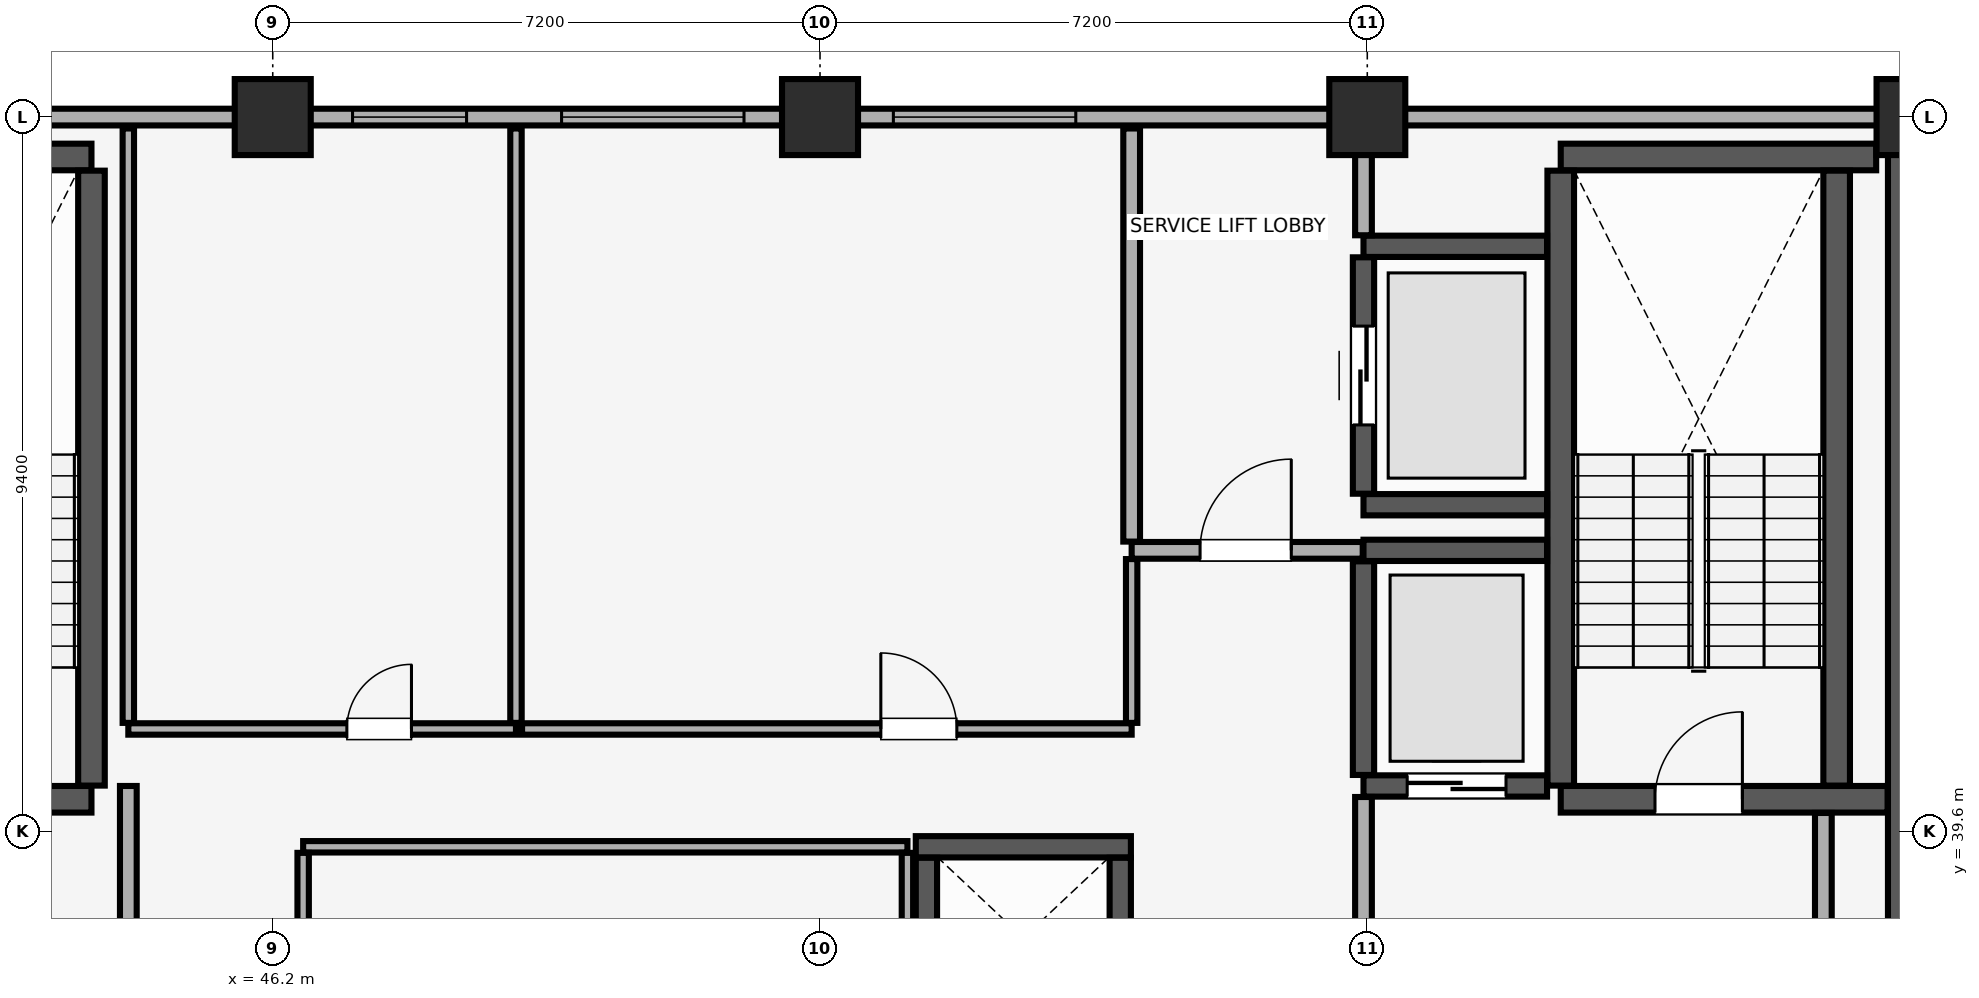
"""IFC4 building model, lengths in metres.
Left out: names, types, materials, properties, quantities, classifications, styles, units other than length and angle.
Written with IfcOpenShell. Run it as: python <this file> out.ifc"""

import sys

from ifc_helpers import new_model, si_unit, direction, frame, frame_2d, origin, origin_2d, place, context, subcontext, project, spatial, rectangle, extrude, element, fill, save


model = new_model("IFC4")
c1 = context("Model", 3, precision=1e-05, world=origin(), true_north=direction((0.0, 1.0)))
c2 = subcontext(c1, "Body", "Model", "MODEL_VIEW")
j1 = project(units=[si_unit("LENGTHUNIT", "METRE"), si_unit("PLANEANGLEUNIT", "RADIAN")], contexts=[c1])
p1 = place(None, origin())
s1 = spatial("IfcSite", under=j1, at=p1, CompositionType="ELEMENT")
p2 = place(p1, origin())
s2 = spatial("IfcBuilding", under=s1, at=p2, CompositionType="ELEMENT")
p3 = place(p2, frame((0.0, 0.0, 276.55)))
s3 = spatial("IfcBuildingStorey", under=s2, at=p3, CompositionType="ELEMENT", Elevation=276.55)
for number, where, z_axis, x_axis in (
    (1, (46.2, 49.0, 0.0), (0.0, 0.0, 1.0), (1.0, 0.0, 0.0)),
    (2, (53.4, 49.0, 0.0), (0.0, 0.0, 1.0), (1.0, 0.0, 0.0)),
    (3, (60.6, 49.0, 0.0), (0.0, 0.0, 1.0), (1.0, 0.0, 0.0)),
    (4, (67.8, 49.0, 0.0), (0.0, 0.0, 1.0), (1.0, 0.0, 0.0)),
):
    element("IfcColumn", number, at=place(p3, frame(where, z_axis=z_axis, x_axis=x_axis)), inside=s3, PredefinedType="COLUMN", context=c2, shape_type="SweptSolid", body=[
        extrude(rectangle(XDim=1.0, YDim=1.0, at=origin_2d()), origin(), (0.0, 0.0, 1.0), 3.6),
    ])
p4 = place(p3, frame((74.2, 49.0, 0.0), z_axis=(0.0, 0.0, 1.0), x_axis=(-1.0, 0.0, 0.0)))
e5 = element("IfcWall", 5, at=p4, inside=s3, PredefinedType="SOLIDWALL", context=c2, shape_type="SweptSolid", body=[
    extrude(rectangle(XDim=64.4, YDim=0.22, at=frame_2d((32.2, 0.0))), origin(), (0.0, 0.0, 1.0), 2.8),
])
p5 = place(p4, frame((59.815, 0.0, 0.85)))
e6 = element("IfcOpeningElement", 6, at=p5, cuts=e5, PredefinedType="OPENING", context=c2, shape_type="SweptSolid", body=[
    extrude(rectangle(XDim=3.0, YDim=1.5, at=frame_2d((1.5, 0.75))), frame((0.0, 0.12, 0.0), z_axis=(0.0, -1.0, 0.0), x_axis=(1.0, 0.0, 0.0)), (0.0, 0.0, 1.0), 0.24),
])
p6 = place(p4, frame((1.585, 0.0, 0.85)))
e7 = element("IfcOpeningElement", 7, at=p6, cuts=e5, PredefinedType="OPENING", context=c2, shape_type="SweptSolid", body=[
    extrude(rectangle(XDim=3.0, YDim=1.5, at=frame_2d((1.5, 0.75))), frame((0.0, 0.12, 0.0), z_axis=(0.0, -1.0, 0.0), x_axis=(1.0, 0.0, 0.0)), (0.0, 0.0, 1.0), 0.24),
])
p7 = place(p4, frame((46.665, 0.0, 0.9)))
e8 = element("IfcOpeningElement", 8, at=p7, cuts=e5, PredefinedType="OPENING", context=c2, shape_type="SweptSolid", body=[
    extrude(rectangle(XDim=1.5, YDim=1.4, at=frame_2d((0.75, 0.7))), frame((0.0, 0.12, 0.0), z_axis=(0.0, -1.0, 0.0), x_axis=(1.0, 0.0, 0.0)), (0.0, 0.0, 1.0), 0.24),
])
p8 = place(p4, frame((38.85, 0.0, 0.9)))
e9 = element("IfcOpeningElement", 9, at=p8, cuts=e5, PredefinedType="OPENING", context=c2, shape_type="SweptSolid", body=[
    extrude(rectangle(XDim=3.6, YDim=1.5, at=frame_2d((1.8, 0.75))), frame((0.0, 0.12, 0.0), z_axis=(0.0, -1.0, 0.0), x_axis=(1.0, 0.0, 0.0)), (0.0, 0.0, 1.0), 0.24),
])
p9 = place(p4, frame((25.45, 0.0, 0.9)))
e10 = element("IfcOpeningElement", 10, at=p9, cuts=e5, PredefinedType="OPENING", context=c2, shape_type="SweptSolid", body=[
    extrude(rectangle(XDim=1.5, YDim=1.4, at=frame_2d((0.75, 0.7))), frame((0.0, 0.12, 0.0), z_axis=(0.0, -1.0, 0.0), x_axis=(1.0, 0.0, 0.0)), (0.0, 0.0, 1.0), 0.24),
])
p10 = place(p4, frame((21.8, 0.0, 0.9)))
e11 = element("IfcOpeningElement", 11, at=p10, cuts=e5, PredefinedType="OPENING", context=c2, shape_type="SweptSolid", body=[
    extrude(rectangle(XDim=2.4, YDim=1.5, at=frame_2d((1.2, 0.75))), frame((0.0, 0.12, 0.0), z_axis=(0.0, -1.0, 0.0), x_axis=(1.0, 0.0, 0.0)), (0.0, 0.0, 1.0), 0.24),
])
p11 = place(p4, frame((17.435, 0.0, 0.9)))
e12 = element("IfcOpeningElement", 12, at=p11, cuts=e5, PredefinedType="OPENING", context=c2, shape_type="SweptSolid", body=[
    extrude(rectangle(XDim=2.4, YDim=1.5, at=frame_2d((1.2, 0.75))), frame((0.0, 0.12, 0.0), z_axis=(0.0, -1.0, 0.0), x_axis=(1.0, 0.0, 0.0)), (0.0, 0.0, 1.0), 0.24),
])
p12 = place(p3, frame((67.8, 29.4, 0.0), z_axis=(0.0, 0.0, 1.0), x_axis=(0.0, 1.0, 0.0)))
e13 = element("IfcWall", 13, at=p12, inside=s3, PredefinedType="SHEAR", context=c2, shape_type="SweptSolid", body=[
    extrude(rectangle(XDim=19.2, YDim=0.7, at=frame_2d((9.6, 0.0))), origin(), (0.0, 0.0, 1.0), 3.6),
])
p13 = place(p3, frame((40.185, 40.025, 0.0), z_axis=(0.0, 0.0, 1.0), x_axis=(1.0, 0.0, 0.0)))
e14 = element("IfcWall", 14, at=p13, inside=s3, PredefinedType="SHEAR", context=c2, shape_type="SweptSolid", body=[
    extrude(rectangle(XDim=3.63, YDim=0.35, at=frame_2d((1.815, 0.0))), origin(), (0.0, 0.0, 1.0), 3.6),
])
p14 = place(p13, frame((1.24, 0.0, 0.0)))
e15 = element("IfcOpeningElement", 15, at=p14, cuts=e14, PredefinedType="OPENING", context=c2, shape_type="SweptSolid", body=[
    extrude(rectangle(XDim=1.15, YDim=2.15, at=frame_2d((0.575, 1.075))), frame((0.0, 0.185, 0.0), z_axis=(0.0, -1.0, 0.0), x_axis=(1.0, 0.0, 0.0)), (0.0, 0.0, 1.0), 0.37),
])
p15 = place(p3, frame((40.185, 48.475, 0.0), z_axis=(0.0, 0.0, 1.0), x_axis=(1.0, 0.0, 0.0)))
e16 = element("IfcWall", 16, at=p15, inside=s3, PredefinedType="SHEAR", context=c2, shape_type="SweptSolid", body=[
    extrude(rectangle(XDim=3.63, YDim=0.35, at=frame_2d((1.815, 0.0))), origin(), (0.0, 0.0, 1.0), 3.6),
])
p16 = place(p3, frame((43.815, 40.205, 0.0), z_axis=(0.0, 0.0, 1.0), x_axis=(0.0, 1.0, 0.0)))
e17 = element("IfcWall", 17, at=p16, inside=s3, PredefinedType="SHEAR", context=c2, shape_type="SweptSolid", body=[
    extrude(rectangle(XDim=8.09, YDim=0.35, at=frame_2d((4.045, 0.0))), origin(), (0.0, 0.0, 1.0), 3.6),
])
p17 = place(p3, frame((63.145, 40.025, 0.0), z_axis=(0.0, 0.0, 1.0), x_axis=(1.0, 0.0, 0.0)))
e18 = element("IfcWall", 18, at=p17, inside=s3, PredefinedType="SHEAR", context=c2, shape_type="SweptSolid", body=[
    extrude(rectangle(XDim=4.3, YDim=0.35, at=frame_2d((2.15, 0.0))), origin(), (0.0, 0.0, 1.0), 3.6),
])
p18 = place(p17, frame((1.24, 0.0, 0.0)))
e19 = element("IfcOpeningElement", 19, at=p18, cuts=e18, PredefinedType="OPENING", context=c2, shape_type="SweptSolid", body=[
    extrude(rectangle(XDim=1.15, YDim=2.15, at=frame_2d((0.575, 1.075))), frame((0.0, 0.185, 0.0), z_axis=(0.0, -1.0, 0.0), x_axis=(1.0, 0.0, 0.0)), (0.0, 0.0, 1.0), 0.37),
])
p19 = place(p3, frame((63.145, 48.475, 0.0), z_axis=(0.0, 0.0, 1.0), x_axis=(1.0, 0.0, 0.0)))
e20 = element("IfcWall", 20, at=p19, inside=s3, PredefinedType="SHEAR", context=c2, shape_type="SweptSolid", body=[
    extrude(rectangle(XDim=4.15, YDim=0.35, at=frame_2d((2.075, 0.0))), origin(), (0.0, 0.0, 1.0), 3.6),
])
for number, where, z_axis, x_axis in (
    (21, (63.145, 40.205, 0.0), (0.0, 0.0, 1.0), (0.0, 1.0, 0.0)),
    (22, (66.775, 40.205, 0.0), (0.0, 0.0, 1.0), (0.0, 1.0, 0.0)),
):
    element("IfcWall", number, at=place(p3, frame(where, z_axis=z_axis, x_axis=x_axis)), inside=s3, PredefinedType="SHEAR", context=c2, shape_type="SweptSolid", body=[
        extrude(rectangle(XDim=8.09, YDim=0.35, at=frame_2d((4.045, 0.0))), origin(), (0.0, 0.0, 1.0), 3.6),
    ])
p20 = place(p3, frame((54.66, 39.4, 0.0), z_axis=(0.0, 0.0, 1.0), x_axis=(1.0, 0.0, 0.0)))
e23 = element("IfcWall", 23, at=p20, inside=s3, PredefinedType="SHEAR", context=c2, shape_type="SweptSolid", body=[
    extrude(rectangle(XDim=2.83, YDim=0.28, at=frame_2d((1.415, 0.0))), origin(), (0.0, 0.0, 1.0), 3.6),
])
for number, where, z_axis, x_axis in (
    (24, (54.8, 37.145, 0.0), (0.0, 0.0, 1.0), (0.0, 1.0, 0.0)),
    (25, (57.35, 37.145, 0.0), (0.0, 0.0, 1.0), (0.0, 1.0, 0.0)),
):
    element("IfcWall", number, at=place(p3, frame(where, z_axis=z_axis, x_axis=x_axis)), inside=s3, PredefinedType="SHEAR", context=c2, shape_type="SweptSolid", body=[
        extrude(rectangle(XDim=2.11, YDim=0.28, at=frame_2d((1.055, 0.0))), origin(), (0.0, 0.0, 1.0), 3.6),
    ])
p21 = place(p3, frame((60.55, 40.2, 0.0), z_axis=(0.0, 0.0, 1.0), x_axis=(1.0, 0.0, 0.0)))
e26 = element("IfcWall", 26, at=p21, inside=s3, PredefinedType="SHEAR", context=c2, shape_type="SweptSolid", body=[
    extrude(rectangle(XDim=2.415, YDim=0.28, at=frame_2d((1.208, 0.0))), origin(), (0.0, 0.0, 1.0), 3.6),
])
p22 = place(p21, frame((0.575, 0.0, 0.0)))
e27 = element("IfcOpeningElement", 27, at=p22, cuts=e26, PredefinedType="OPENING", context=c2, shape_type="SweptSolid", body=[
    extrude(rectangle(XDim=1.3, YDim=2.3, at=frame_2d((0.65, 1.15))), frame((0.0, 0.15, 0.0), z_axis=(0.0, -1.0, 0.0), x_axis=(1.0, 0.0, 0.0)), (0.0, 0.0, 1.0), 0.3),
])
p23 = place(p3, frame((60.55, 43.3, 0.0), z_axis=(0.0, 0.0, 1.0), x_axis=(1.0, 0.0, 0.0)))
e28 = element("IfcWall", 28, at=p23, inside=s3, PredefinedType="SHEAR", context=c2, shape_type="SweptSolid", body=[
    extrude(rectangle(XDim=2.415, YDim=0.28, at=frame_2d((1.208, 0.0))), origin(), (0.0, 0.0, 1.0), 3.6),
])
p24 = place(p3, frame((60.55, 40.345, 0.0), z_axis=(0.0, 0.0, 1.0), x_axis=(0.0, 1.0, 0.0)))
e29 = element("IfcWall", 29, at=p24, inside=s3, PredefinedType="SHEAR", context=c2, shape_type="SweptSolid", body=[
    extrude(rectangle(XDim=2.81, YDim=0.28, at=frame_2d((1.405, 0.0))), origin(), (0.0, 0.0, 1.0), 3.6),
])
for number, where, z_axis, x_axis in (
    (30, (60.55, 43.9, 0.0), (0.0, 0.0, 1.0), (1.0, 0.0, 0.0)),
    (31, (60.55, 47.3, 0.0), (0.0, 0.0, 1.0), (1.0, 0.0, 0.0)),
):
    element("IfcWall", number, at=place(p3, frame(where, z_axis=z_axis, x_axis=x_axis)), inside=s3, PredefinedType="SHEAR", context=c2, shape_type="SweptSolid", body=[
        extrude(rectangle(XDim=2.415, YDim=0.28, at=frame_2d((1.208, 0.0))), origin(), (0.0, 0.0, 1.0), 3.6),
    ])
p25 = place(p3, frame((60.55, 44.045, 0.0), z_axis=(0.0, 0.0, 1.0), x_axis=(0.0, 1.0, 0.0)))
e32 = element("IfcWall", 32, at=p25, inside=s3, PredefinedType="SHEAR", context=c2, shape_type="SweptSolid", body=[
    extrude(rectangle(XDim=3.11, YDim=0.28, at=frame_2d((1.555, 0.0))), origin(), (0.0, 0.0, 1.0), 3.6),
])
p26 = place(p25, frame((0.905, 0.0, 0.0)))
e33 = element("IfcOpeningElement", 33, at=p26, cuts=e32, PredefinedType="OPENING", context=c2, shape_type="SweptSolid", body=[
    extrude(rectangle(XDim=1.3, YDim=2.3, at=frame_2d((0.65, 1.15))), frame((0.0, 0.15, 0.0), z_axis=(0.0, -1.0, 0.0), x_axis=(1.0, 0.0, 0.0)), (0.0, 0.0, 1.0), 0.3),
])
p27 = place(p3, frame((60.55, 34.415, 0.0), z_axis=(0.0, 0.0, 1.0), x_axis=(0.0, 1.0, 0.0)))
e34 = element("IfcWall", 34, at=p27, inside=s3, PredefinedType="PARTITIONING", context=c2, shape_type="SweptSolid", body=[
    extrude(rectangle(XDim=5.64, YDim=0.22, at=frame_2d((2.82, 0.0))), origin(), (0.0, 0.0, 1.0), 3.6),
])
p28 = place(p3, frame((66.6, 34.415, 0.0), z_axis=(0.0, 0.0, 1.0), x_axis=(0.0, 1.0, 0.0)))
e35 = element("IfcWall", 35, at=p28, inside=s3, PredefinedType="PARTITIONING", context=c2, shape_type="SweptSolid", body=[
    extrude(rectangle(XDim=5.43, YDim=0.22, at=frame_2d((2.715, 0.0))), origin(), (0.0, 0.0, 1.0), 3.6),
])
p29 = place(p3, frame((44.3, 34.415, 0.0), z_axis=(0.0, 0.0, 1.0), x_axis=(0.0, 1.0, 0.0)))
e36 = element("IfcWall", 36, at=p29, inside=s3, PredefinedType="PARTITIONING", context=c2, shape_type="SweptSolid", body=[
    extrude(rectangle(XDim=5.785, YDim=0.22, at=frame_2d((2.893, 0.0))), origin(), (0.0, 0.0, 1.0), 3.6),
])
p30 = place(p3, frame((57.5, 43.3, 0.0), z_axis=(0.0, 0.0, 1.0), x_axis=(1.0, 0.0, 0.0)))
e37 = element("IfcWall", 37, at=p30, inside=s3, PredefinedType="PARTITIONING", context=c2, shape_type="SweptSolid", body=[
    extrude(rectangle(XDim=3.04, YDim=0.22, at=frame_2d((1.52, 0.0))), origin(), (0.0, 0.0, 1.0), 3.6),
])
p31 = place(p30, frame((0.9, 0.0, 0.0)))
e38 = element("IfcOpeningElement", 38, at=p31, cuts=e37, PredefinedType="OPENING", context=c2, shape_type="SweptSolid", body=[
    extrude(rectangle(XDim=1.2, YDim=2.15, at=frame_2d((0.6, 1.075))), frame((0.0, 0.12, 0.0), z_axis=(0.0, -1.0, 0.0), x_axis=(1.0, 0.0, 0.0)), (0.0, 0.0, 1.0), 0.24),
])
p32 = place(p3, frame((57.5, 43.415, 0.0), z_axis=(0.0, 0.0, 1.0), x_axis=(0.0, 1.0, 0.0)))
e39 = element("IfcWall", 39, at=p32, inside=s3, PredefinedType="PARTITIONING", context=c2, shape_type="SweptSolid", body=[
    extrude(rectangle(XDim=5.435, YDim=0.22, at=frame_2d((2.718, 0.0))), origin(), (0.0, 0.0, 1.0), 3.6),
])
p33 = place(p3, frame((60.55, 47.445, 0.0), z_axis=(0.0, 0.0, 1.0), x_axis=(0.0, 1.0, 0.0)))
e40 = element("IfcWall", 40, at=p33, inside=s3, PredefinedType="PARTITIONING", context=c2, shape_type="SweptSolid", body=[
    extrude(rectangle(XDim=1.405, YDim=0.22, at=frame_2d((0.703, 0.0))), origin(), (0.0, 0.0, 1.0), 3.6),
])
p34 = place(p3, frame((46.6, 39.4, 0.0), z_axis=(0.0, 0.0, 1.0), x_axis=(1.0, 0.0, 0.0)))
e41 = element("IfcWall", 41, at=p34, inside=s3, PredefinedType="PARTITIONING", context=c2, shape_type="SweptSolid", body=[
    extrude(rectangle(XDim=7.95, YDim=0.15, at=frame_2d((3.975, 0.0))), origin(), (0.0, 0.0, 1.0), 3.6),
])
for number, where, z_axis, x_axis in (
    (42, (46.6, 34.38, 0.0), (0.0, 0.0, 1.0), (0.0, 1.0, 0.0)),
    (43, (54.55, 34.38, 0.0), (0.0, 0.0, 1.0), (0.0, 1.0, 0.0)),
):
    element("IfcWall", number, at=place(p3, frame(where, z_axis=z_axis, x_axis=x_axis)), inside=s3, PredefinedType="PARTITIONING", context=c2, shape_type="SweptSolid", body=[
        extrude(rectangle(XDim=4.94, YDim=0.15, at=frame_2d((2.47, 0.0))), origin(), (0.0, 0.0, 1.0), 3.6),
    ])
p35 = place(p3, frame((44.3, 40.95, 0.0), z_axis=(0.0, 0.0, 1.0), x_axis=(1.0, 0.0, 0.0)))
e44 = element("IfcWall", 44, at=p35, inside=s3, PredefinedType="PARTITIONING", context=c2, shape_type="SweptSolid", body=[
    extrude(rectangle(XDim=5.1, YDim=0.15, at=frame_2d((2.55, 0.0))), origin(), (0.0, 0.0, 1.0), 3.6),
])
p36 = place(p35, frame((2.875, 0.0, 0.0)))
e45 = element("IfcOpeningElement", 45, at=p36, cuts=e44, PredefinedType="OPENING", context=c2, shape_type="SweptSolid", body=[
    extrude(rectangle(XDim=0.85, YDim=2.1, at=frame_2d((0.425, 1.05))), frame((0.0, 0.085, 0.0), z_axis=(0.0, -1.0, 0.0), x_axis=(1.0, 0.0, 0.0)), (0.0, 0.0, 1.0), 0.17),
])
for number, where, z_axis, x_axis in (
    (46, (44.3, 41.03, 0.0), (0.0, 0.0, 1.0), (0.0, 1.0, 0.0)),
    (47, (49.4, 41.03, 0.0), (0.0, 0.0, 1.0), (0.0, 1.0, 0.0)),
):
    element("IfcWall", number, at=place(p3, frame(where, z_axis=z_axis, x_axis=x_axis)), inside=s3, PredefinedType="PARTITIONING", context=c2, shape_type="SweptSolid", body=[
        extrude(rectangle(XDim=7.82, YDim=0.15, at=frame_2d((3.91, 0.0))), origin(), (0.0, 0.0, 1.0), 3.6),
    ])
p37 = place(p3, frame((49.48, 40.95, 0.0), z_axis=(0.0, 0.0, 1.0), x_axis=(1.0, 0.0, 0.0)))
e48 = element("IfcWall", 48, at=p37, inside=s3, PredefinedType="PARTITIONING", context=c2, shape_type="SweptSolid", body=[
    extrude(rectangle(XDim=8.02, YDim=0.15, at=frame_2d((4.01, 0.0))), origin(), (0.0, 0.0, 1.0), 3.6),
])
p38 = place(p37, frame((4.72, 0.0, 0.0)))
e49 = element("IfcOpeningElement", 49, at=p38, cuts=e48, PredefinedType="OPENING", context=c2, shape_type="SweptSolid", body=[
    extrude(rectangle(XDim=1.0, YDim=2.15, at=frame_2d((0.5, 1.075))), frame((0.0, 0.085, 0.0), z_axis=(0.0, -1.0, 0.0), x_axis=(1.0, 0.0, 0.0)), (0.0, 0.0, 1.0), 0.17),
])
p39 = place(p3, frame((57.5, 41.03, 0.0), z_axis=(0.0, 0.0, 1.0), x_axis=(0.0, 1.0, 0.0)))
e50 = element("IfcWall", 50, at=p39, inside=s3, PredefinedType="PARTITIONING", context=c2, shape_type="SweptSolid", body=[
    extrude(rectangle(XDim=2.155, YDim=0.15, at=frame_2d((1.078, 0.0))), origin(), (0.0, 0.0, 1.0), 3.6),
])
p40 = place(p9, origin())
e51 = element("IfcWindow", 51, at=p40, inside=s3, PartitioningType="SINGLE_PANEL", PredefinedType="WINDOW", context=c2, shape_type="SweptSolid", body=[
    extrude(rectangle(XDim=1.5, YDim=1.4, at=frame_2d((0.75, 0.7))), frame((0.0, 0.03, 0.0), z_axis=(0.0, -1.0, 0.0), x_axis=(1.0, 0.0, 0.0)), (0.0, 0.0, 1.0), 0.06),
])
fill(e10, e51)
p41 = place(p10, origin())
e52 = element("IfcWindow", 52, at=p41, inside=s3, PartitioningType="SINGLE_PANEL", PredefinedType="WINDOW", context=c2, shape_type="SweptSolid", body=[
    extrude(rectangle(XDim=2.4, YDim=1.5, at=frame_2d((1.2, 0.75))), frame((0.0, 0.03, 0.0), z_axis=(0.0, -1.0, 0.0), x_axis=(1.0, 0.0, 0.0)), (0.0, 0.0, 1.0), 0.06),
])
fill(e11, e52)
p42 = place(p11, origin())
e53 = element("IfcWindow", 53, at=p42, inside=s3, PartitioningType="SINGLE_PANEL", PredefinedType="WINDOW", context=c2, shape_type="SweptSolid", body=[
    extrude(rectangle(XDim=2.4, YDim=1.5, at=frame_2d((1.2, 0.75))), frame((0.0, 0.03, 0.0), z_axis=(0.0, -1.0, 0.0), x_axis=(1.0, 0.0, 0.0)), (0.0, 0.0, 1.0), 0.06),
])
fill(e12, e53)
p43 = place(p18, origin())
e54 = element("IfcDoor", 54, at=p43, inside=s3, OperationType="SINGLE_SWING_RIGHT", PredefinedType="DOOR", context=c2, shape_type="SweptSolid", body=[
    extrude(rectangle(XDim=1.15, YDim=2.15, at=frame_2d((0.575, 1.075))), frame((0.0, 0.025, 0.0), z_axis=(0.0, -1.0, 0.0), x_axis=(1.0, 0.0, 0.0)), (0.0, 0.0, 1.0), 0.05),
])
fill(e19, e54)
p44 = place(p22, origin())
e55 = element("IfcDoor", 55, at=p44, inside=s3, OperationType="DOUBLE_DOOR_SLIDING", PredefinedType="DOOR", context=c2, shape_type="SweptSolid", body=[
    extrude(rectangle(XDim=1.3, YDim=2.3, at=frame_2d((0.65, 1.15))), frame((0.0, 0.025, 0.0), z_axis=(0.0, -1.0, 0.0), x_axis=(1.0, 0.0, 0.0)), (0.0, 0.0, 1.0), 0.05),
])
fill(e27, e55)
p45 = place(p26, origin())
e56 = element("IfcDoor", 56, at=p45, inside=s3, OperationType="DOUBLE_DOOR_SLIDING", PredefinedType="DOOR", context=c2, shape_type="SweptSolid", body=[
    extrude(rectangle(XDim=1.3, YDim=2.3, at=frame_2d((0.65, 1.15))), frame((0.0, 0.025, 0.0), z_axis=(0.0, -1.0, 0.0), x_axis=(1.0, 0.0, 0.0)), (0.0, 0.0, 1.0), 0.05),
])
fill(e33, e56)
p46 = place(p31, origin())
e57 = element("IfcDoor", 57, at=p46, inside=s3, OperationType="SINGLE_SWING_RIGHT", PredefinedType="DOOR", context=c2, shape_type="SweptSolid", body=[
    extrude(rectangle(XDim=1.2, YDim=2.15, at=frame_2d((0.6, 1.075))), frame((0.0, 0.025, 0.0), z_axis=(0.0, -1.0, 0.0), x_axis=(1.0, 0.0, 0.0)), (0.0, 0.0, 1.0), 0.05),
])
fill(e38, e57)
p47 = place(p36, origin())
e58 = element("IfcDoor", 58, at=p47, inside=s3, OperationType="SINGLE_SWING_RIGHT", PredefinedType="DOOR", context=c2, shape_type="SweptSolid", body=[
    extrude(rectangle(XDim=0.85, YDim=2.1, at=frame_2d((0.425, 1.05))), frame((0.0, 0.025, 0.0), z_axis=(0.0, -1.0, 0.0), x_axis=(1.0, 0.0, 0.0)), (0.0, 0.0, 1.0), 0.05),
])
fill(e45, e58)
p48 = place(p38, origin())
e59 = element("IfcDoor", 59, at=p48, inside=s3, OperationType="SINGLE_SWING_LEFT", PredefinedType="DOOR", context=c2, shape_type="SweptSolid", body=[
    extrude(rectangle(XDim=1.0, YDim=2.15, at=frame_2d((0.5, 1.075))), frame((0.0, 0.025, 0.0), z_axis=(0.0, -1.0, 0.0), x_axis=(1.0, 0.0, 0.0)), (0.0, 0.0, 1.0), 0.05),
])
fill(e49, e59)
save(model, sys.argv[1])
